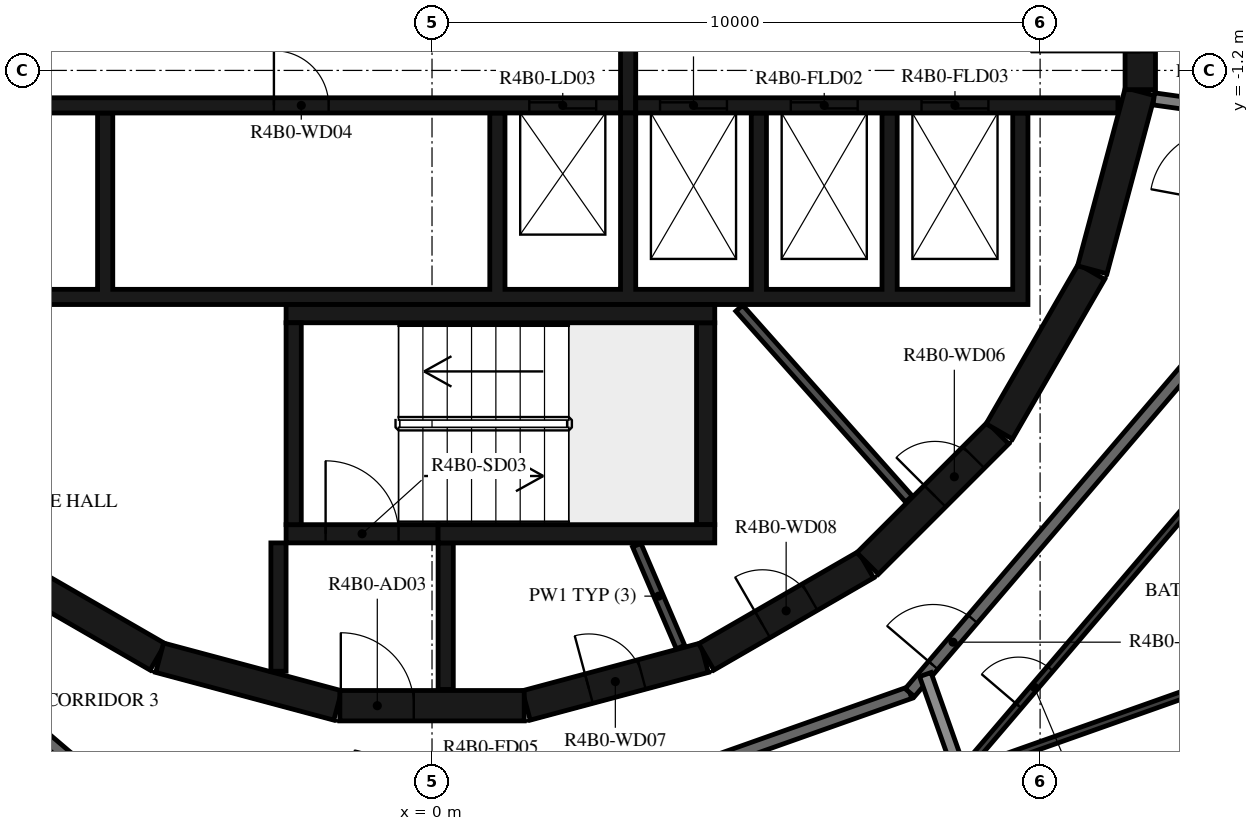
"""IFC4 building model, lengths in metres.
Left out: names, types, materials, properties, quantities, classifications, styles, units other than length and angle.
Written with IfcOpenShell. Run it as: python <this file> out.ifc"""

import sys

from ifc_helpers import new_model, si_unit, direction, frame, frame_2d, origin, place, context, subcontext, project, spatial, polyline, rectangle, outline, extrude, element, fill, save


model = new_model("IFC4")
c1 = context("Model", 3, precision=1e-05, world=origin(), true_north=direction((0.0, 1.0)))
c2 = subcontext(c1, "Body", "Model", "MODEL_VIEW")
j1 = project(units=[si_unit("LENGTHUNIT", "METRE"), si_unit("PLANEANGLEUNIT", "RADIAN")], contexts=[c1])
p1 = place(None, origin())
s1 = spatial("IfcSite", under=j1, at=p1, CompositionType="ELEMENT")
p2 = place(p1, origin())
s2 = spatial("IfcBuilding", under=s1, at=p2, CompositionType="ELEMENT")
p3 = place(p2, frame((0.0, 0.0, 165.7)))
s3 = spatial("IfcBuildingStorey", under=s2, at=p3, CompositionType="ELEMENT", Elevation=165.7)
p4 = place(p3, frame((1.55, -11.643, 0.0), z_axis=(0.0, 0.0, 1.0), x_axis=(0.965948410781, 0.258734743916, 0.0)))
e1 = element("IfcWall", 1, at=p4, inside=s3, PredefinedType="SHEAR", context=c2, shape_type="SweptSolid", body=[
    extrude(rectangle(XDim=3.033, YDim=0.5, at=frame_2d((1.516, 0.0))), origin(), (0.0, 0.0, 1.0), 3.12),
])
p5 = place(p4, frame((1.066, 0.0, 0.0)))
e2 = element("IfcOpeningElement", 2, at=p5, cuts=e1, PredefinedType="OPENING", context=c2, shape_type="SweptSolid", body=[
    extrude(rectangle(XDim=0.9, YDim=2.1, at=frame_2d((0.45, 1.05))), frame((0.0, 0.26, 0.0), z_axis=(0.0, -1.0, 0.0), x_axis=(1.0, 0.0, 0.0)), (0.0, 0.0, 1.0), 0.52),
])
p6 = place(p3, frame((4.51, -10.845, 0.0), z_axis=(0.0, 0.0, 1.0), x_axis=(0.865975092491, 0.500087131594, 0.0)))
e3 = element("IfcWall", 3, at=p6, inside=s3, PredefinedType="SHEAR", context=c2, shape_type="SweptSolid", body=[
    extrude(rectangle(XDim=3.033, YDim=0.5, at=frame_2d((1.516, 0.0))), origin(), (0.0, 0.0, 1.0), 3.12),
])
p7 = place(p6, frame((1.066, 0.0, 0.0)))
e4 = element("IfcOpeningElement", 4, at=p7, cuts=e3, PredefinedType="OPENING", context=c2, shape_type="SweptSolid", body=[
    extrude(rectangle(XDim=0.9, YDim=2.1, at=frame_2d((0.45, 1.05))), frame((0.0, 0.26, 0.0), z_axis=(0.0, -1.0, 0.0), x_axis=(1.0, 0.0, 0.0)), (0.0, 0.0, 1.0), 0.52),
])
p8 = place(p3, frame((7.164, -9.308, 0.0), z_axis=(0.0, 0.0, 1.0), x_axis=(0.707106781187, 0.707106781187, 0.0)))
e5 = element("IfcWall", 5, at=p8, inside=s3, PredefinedType="SHEAR", context=c2, shape_type="SweptSolid", body=[
    extrude(rectangle(XDim=3.032, YDim=0.5, at=frame_2d((1.516, 0.0))), origin(), (0.0, 0.0, 1.0), 3.12),
])
p9 = place(p8, frame((1.566, 0.0, 0.0)))
e6 = element("IfcOpeningElement", 6, at=p9, cuts=e5, PredefinedType="OPENING", context=c2, shape_type="SweptSolid", body=[
    extrude(rectangle(XDim=0.9, YDim=2.1, at=frame_2d((0.45, 1.05))), frame((0.0, 0.26, 0.0), z_axis=(0.0, -1.0, 0.0), x_axis=(1.0, 0.0, 0.0)), (0.0, 0.0, 1.0), 0.52),
])
for number, where, z_axis, x_axis in (
    (7, (9.329, -7.137, 0.0), (0.0, 0.0, 1.0), (0.5, 0.866, 0.0)),
    (8, (10.858, -4.479, 0.0), (0.0, 0.0, 1.0), (0.259, 0.966, 0.0)),
):
    element("IfcWall", number, at=place(p3, frame(where, z_axis=z_axis, x_axis=x_axis)), inside=s3, PredefinedType="SHEAR", context=c2, shape_type="SweptSolid", body=[
        extrude(rectangle(XDim=3.033, YDim=0.5, at=frame_2d((1.516, 0.0))), origin(), (0.0, 0.0, 1.0), 3.12),
    ])
p10 = place(p3, frame((11.647, -1.516, 0.0), z_axis=(0.0, 0.0, 1.0), x_axis=(0.0, 1.0, 0.0)))
e9 = element("IfcWall", 9, at=p10, inside=s3, PredefinedType="SHEAR", context=c2, shape_type="SweptSolid", body=[
    extrude(rectangle(XDim=3.033, YDim=0.5, at=frame_2d((1.516, 0.0))), origin(), (0.0, 0.0, 1.0), 3.12),
])
p11 = place(p10, frame((0.616, 0.0, 0.0)))
e10 = element("IfcOpeningElement", 10, at=p11, cuts=e9, PredefinedType="OPENING", context=c2, shape_type="SweptSolid", body=[
    extrude(rectangle(XDim=1.8, YDim=2.1, at=frame_2d((0.9, 1.05))), frame((0.0, 0.26, 0.0), z_axis=(0.0, -1.0, 0.0), x_axis=(1.0, 0.0, 0.0)), (0.0, 0.0, 1.0), 0.52),
])
for number, where, z_axis, x_axis in (
    (11, (-7.137, -9.329, 0.0), (0.0, 0.0, 1.0), (0.866, -0.5, 0.0)),
    (12, (-4.479, -10.858, 0.0), (0.0, 0.0, 1.0), (0.966, -0.259, 0.0)),
):
    element("IfcWall", number, at=place(p3, frame(where, z_axis=z_axis, x_axis=x_axis)), inside=s3, PredefinedType="SHEAR", context=c2, shape_type="SweptSolid", body=[
        extrude(rectangle(XDim=3.033, YDim=0.5, at=frame_2d((1.516, 0.0))), origin(), (0.0, 0.0, 1.0), 3.12),
    ])
p12 = place(p3, frame((-1.516, -11.647, 0.0), z_axis=(0.0, 0.0, 1.0), x_axis=(1.0, 0.0, 0.0)))
e13 = element("IfcWall", 13, at=p12, inside=s3, PredefinedType="SHEAR", context=c2, shape_type="SweptSolid", body=[
    extrude(rectangle(XDim=3.033, YDim=0.5, at=frame_2d((1.516, 0.0))), origin(), (0.0, 0.0, 1.0), 3.12),
])
p13 = place(p12, frame((0.016, 0.0, 0.0)))
e14 = element("IfcOpeningElement", 14, at=p13, cuts=e13, PredefinedType="OPENING", context=c2, shape_type="SweptSolid", body=[
    extrude(rectangle(XDim=1.2, YDim=2.1, at=frame_2d((0.6, 1.05))), frame((0.0, 0.26, 0.0), z_axis=(0.0, -1.0, 0.0), x_axis=(1.0, 0.0, 0.0)), (0.0, 0.0, 1.0), 0.52),
])
p14 = place(p3, frame((-2.275, -8.67, 0.0), z_axis=(0.0, 0.0, 1.0), x_axis=(0.0, 1.0, 0.0)))
e15 = element("IfcWall", 15, at=p14, inside=s3, PredefinedType="SHEAR", context=c2, shape_type="SweptSolid", body=[
    extrude(rectangle(XDim=3.32, YDim=0.25, at=frame_2d((1.66, 0.0))), origin(), (0.0, 0.0, 1.0), 3.12),
])
p15 = place(p3, frame((-2.4, -5.2, 0.0), z_axis=(0.0, 0.0, 1.0), x_axis=(1.0, 0.0, 0.0)))
e16 = element("IfcWall", 16, at=p15, inside=s3, PredefinedType="SHEAR", context=c2, shape_type="SweptSolid", body=[
    extrude(rectangle(XDim=7.05, YDim=0.3, at=frame_2d((3.525, 0.0))), origin(), (0.0, 0.0, 1.0), 3.12),
])
p16 = place(p3, frame((4.5, -8.67, 0.0), z_axis=(0.0, 0.0, 1.0), x_axis=(0.0, 1.0, 0.0)))
e17 = element("IfcWall", 17, at=p16, inside=s3, PredefinedType="SHEAR", context=c2, shape_type="SweptSolid", body=[
    extrude(rectangle(XDim=3.32, YDim=0.3, at=frame_2d((1.66, 0.0))), origin(), (0.0, 0.0, 1.0), 3.12),
])
p17 = place(p3, frame((0.1, -8.82, 0.0), z_axis=(0.0, 0.0, 1.0), x_axis=(1.0, 0.0, 0.0)))
e18 = element("IfcWall", 18, at=p17, inside=s3, PredefinedType="SHEAR", context=c2, shape_type="SweptSolid", body=[
    extrude(rectangle(XDim=4.55, YDim=0.3, at=frame_2d((2.275, 0.0))), origin(), (0.0, 0.0, 1.0), 3.12),
])
p18 = place(p3, frame((-2.4, -8.82, 0.0), z_axis=(0.0, 0.0, 1.0), x_axis=(1.0, 0.0, 0.0)))
e19 = element("IfcWall", 19, at=p18, inside=s3, PredefinedType="SHEAR", context=c2, shape_type="SweptSolid", body=[
    extrude(rectangle(XDim=2.5, YDim=0.3, at=frame_2d((1.25, 0.0))), origin(), (0.0, 0.0, 1.0), 3.12),
])
p19 = place(p18, frame((0.65, 0.0, 0.0)))
e20 = element("IfcOpeningElement", 20, at=p19, cuts=e19, PredefinedType="OPENING", context=c2, shape_type="SweptSolid", body=[
    extrude(rectangle(XDim=1.2, YDim=2.1, at=frame_2d((0.6, 1.05))), frame((0.0, 0.16, 0.0), z_axis=(0.0, -1.0, 0.0), x_axis=(1.0, 0.0, 0.0)), (0.0, 0.0, 1.0), 0.32),
])
p20 = place(p3, frame((-2.525, -8.97, 0.0), z_axis=(0.0, 0.0, 1.0), x_axis=(0.0, -1.0, 0.0)))
e21 = element("IfcWall", 21, at=p20, inside=s3, PredefinedType="SHEAR", context=c2, shape_type="SweptSolid", body=[
    extrude(rectangle(XDim=2.11, YDim=0.25, at=frame_2d((1.055, 0.0))), origin(), (0.0, 0.0, 1.0), 3.12),
])
p21 = place(p3, frame((0.225, -8.97, 0.0), z_axis=(0.0, 0.0, 1.0), x_axis=(0.0, -1.0, 0.0)))
e22 = element("IfcWall", 22, at=p21, inside=s3, PredefinedType="SHEAR", context=c2, shape_type="SweptSolid", body=[
    extrude(rectangle(XDim=2.41, YDim=0.25, at=frame_2d((1.205, 0.0))), origin(), (0.0, 0.0, 1.0), 3.12),
])
p22 = place(p3, origin())
e23 = element("IfcWall", 23, at=p22, inside=s3, PredefinedType="SHEAR", context=c2, shape_type="SweptSolid", body=[
    extrude(outline(polyline([(9.8, -5.05), (9.8, -4.8), (9.8, -1.9), (9.55, -1.9), (9.55, -4.8), (7.65, -4.8), (7.65, -1.9), (7.4, -1.9), (7.4, -4.8), (5.5, -4.8), (5.5, -1.9), (5.25, -1.9), (5.25, -4.8), (3.35, -4.8), (3.35, -1.9), (3.1, -1.9), (3.1, -4.8), (1.2, -4.8), (1.2, -1.9), (0.95, -1.9), (0.95, -4.8), (-5.25, -4.8), (-5.25, -1.9), (-5.5, -1.9), (-5.5, -4.8), (-7.4, -4.8), (-7.4, -1.9), (-7.65, -1.9), (-7.65, -4.8), (-9.55, -4.8), (-9.55, -1.9), (-9.8, -1.9), (-9.8, -4.8), (-9.8, -5.05), (9.8, -5.05)])), origin(), (0.0, 0.0, 1.0), 3.12),
])
p23 = place(p3, frame((-11.28, -1.775, 0.0), z_axis=(0.0, 0.0, 1.0), x_axis=(1.0, 0.0, 0.0)))
e24 = element("IfcWall", 24, at=p23, inside=s3, PredefinedType="SHEAR", context=c2, shape_type="SweptSolid", body=[
    extrude(rectangle(XDim=14.38, YDim=0.25, at=frame_2d((7.19, 0.0))), origin(), (0.0, 0.0, 1.0), 3.12),
])
p24 = place(p23, frame((12.88, 0.0, 0.0)))
e25 = element("IfcOpeningElement", 25, at=p24, cuts=e24, PredefinedType="OPENING", context=c2, shape_type="SweptSolid", body=[
    extrude(rectangle(XDim=1.1, YDim=2.1, at=frame_2d((0.55, 1.05))), frame((0.0, 0.135, 0.0), z_axis=(0.0, -1.0, 0.0), x_axis=(1.0, 0.0, 0.0)), (0.0, 0.0, 1.0), 0.27),
])
p25 = place(p23, frame((8.68, 0.0, 0.0)))
e26 = element("IfcOpeningElement", 26, at=p25, cuts=e24, PredefinedType="OPENING", context=c2, shape_type="SweptSolid", body=[
    extrude(rectangle(XDim=0.9, YDim=2.1, at=frame_2d((0.45, 1.05))), frame((0.0, 0.135, 0.0), z_axis=(0.0, -1.0, 0.0), x_axis=(1.0, 0.0, 0.0)), (0.0, 0.0, 1.0), 0.27),
])
p26 = place(p3, frame((3.35, -1.775, 0.0), z_axis=(0.0, 0.0, 1.0), x_axis=(1.0, 0.0, 0.0)))
e27 = element("IfcWall", 27, at=p26, inside=s3, PredefinedType="SHEAR", context=c2, shape_type="SweptSolid", body=[
    extrude(rectangle(XDim=7.93, YDim=0.25, at=frame_2d((3.965, 0.0))), origin(), (0.0, 0.0, 1.0), 3.12),
])
p27 = place(p26, frame((0.4, 0.0, 0.0)))
e28 = element("IfcOpeningElement", 28, at=p27, cuts=e27, PredefinedType="OPENING", context=c2, shape_type="SweptSolid", body=[
    extrude(rectangle(XDim=1.1, YDim=2.4, at=frame_2d((0.55, 1.2))), frame((0.0, 0.135, 0.0), z_axis=(0.0, -1.0, 0.0), x_axis=(1.0, 0.0, 0.0)), (0.0, 0.0, 1.0), 0.27),
])
p28 = place(p26, frame((2.55, 0.0, 0.0)))
e29 = element("IfcOpeningElement", 29, at=p28, cuts=e27, PredefinedType="OPENING", context=c2, shape_type="SweptSolid", body=[
    extrude(rectangle(XDim=1.1, YDim=2.4, at=frame_2d((0.55, 1.2))), frame((0.0, 0.135, 0.0), z_axis=(0.0, -1.0, 0.0), x_axis=(1.0, 0.0, 0.0)), (0.0, 0.0, 1.0), 0.27),
])
p29 = place(p26, frame((4.7, 0.0, 0.0)))
e30 = element("IfcOpeningElement", 30, at=p29, cuts=e27, PredefinedType="OPENING", context=c2, shape_type="SweptSolid", body=[
    extrude(rectangle(XDim=1.1, YDim=2.4, at=frame_2d((0.55, 1.2))), frame((0.0, 0.135, 0.0), z_axis=(0.0, -1.0, 0.0), x_axis=(1.0, 0.0, 0.0)), (0.0, 0.0, 1.0), 0.27),
])
p30 = place(p3, frame((3.225, -1.9, 0.0), z_axis=(0.0, 0.0, 1.0), x_axis=(0.0, 1.0, 0.0)))
e31 = element("IfcWall", 31, at=p30, inside=s3, PredefinedType="SHEAR", context=c2, shape_type="SweptSolid", body=[
    extrude(rectangle(XDim=3.8, YDim=0.25, at=frame_2d((1.9, 0.0))), origin(), (0.0, 0.0, 1.0), 3.12),
])
p31 = place(p3, frame((7.842, -8.248, 0.0), z_axis=(0.0, 0.0, 1.0), x_axis=(-0.66446128181, 0.747322691329, 0.0)))
e32 = element("IfcWall", 32, at=p31, inside=s3, PredefinedType="PARTITIONING", context=c2, shape_type="SweptSolid", body=[
    extrude(rectangle(XDim=4.198, YDim=0.15, at=frame_2d((2.099, 0.0))), origin(), (0.0, 0.0, 1.0), 3.12),
])
p32 = place(p3, frame((3.367, -9.007, 0.0), z_axis=(0.0, 0.0, 1.0), x_axis=(0.394387482265, -0.918944238696, 0.0)))
e33 = element("IfcWall", 33, at=p32, inside=s3, PredefinedType="PARTITIONING", context=c2, shape_type="SweptSolid", body=[
    extrude(rectangle(XDim=1.825, YDim=0.15, at=frame_2d((0.913, 0.0))), origin(), (0.0, 0.0, 1.0), 3.12),
])
p33 = place(p3, frame((13.282, -1.867, 0.0), z_axis=(0.0, 0.0, 1.0), x_axis=(-0.990265430288, 0.139191873241, 0.0)))
e34 = element("IfcWall", 34, at=p33, inside=s3, PredefinedType="STANDARD", context=c2, shape_type="SweptSolid", body=[
    extrude(rectangle(XDim=1.426, YDim=0.2, at=frame_2d((0.713, 0.0))), origin(), (0.0, 0.0, 1.0), 3.12),
])
p34 = place(p3, frame((-11.433, -7.858, 0.0), z_axis=(0.0, 0.0, 1.0), x_axis=(0.760412154545, -0.649440801937, 0.0)))
e35 = element("IfcWall", 35, at=p34, inside=s3, PredefinedType="STANDARD", context=c2, shape_type="SweptSolid", body=[
    extrude(rectangle(XDim=7.181, YDim=0.2, at=frame_2d((3.59, 0.0))), origin(), (0.0, 0.0, 1.0), 3.12),
])
p35 = place(p34, frame((2.39, 0.0, 0.0)))
e36 = element("IfcOpeningElement", 36, at=p35, cuts=e35, PredefinedType="OPENING", context=c2, shape_type="SweptSolid", body=[
    extrude(rectangle(XDim=1.0, YDim=2.1, at=frame_2d((0.5, 1.05))), frame((0.0, 0.11, 0.0), z_axis=(0.0, -1.0, 0.0), x_axis=(1.0, 0.0, 0.0)), (0.0, 0.0, 1.0), 0.22),
])
p36 = place(p3, frame((1.088, -13.83, 0.0), z_axis=(0.0, 0.0, 1.0), x_axis=(0.942648397945, 0.333787354241, 0.0)))
e37 = element("IfcWall", 37, at=p36, inside=s3, PredefinedType="STANDARD", context=c2, shape_type="SweptSolid", body=[
    extrude(rectangle(XDim=7.181, YDim=0.2, at=frame_2d((3.591, 0.0))), origin(), (0.0, 0.0, 1.0), 3.12),
])
p37 = place(p3, frame((7.858, -11.433, 0.0), z_axis=(0.0, 0.0, 1.0), x_axis=(0.649440801937, 0.760412154545, 0.0)))
e38 = element("IfcWall", 38, at=p37, inside=s3, PredefinedType="STANDARD", context=c2, shape_type="SweptSolid", body=[
    extrude(rectangle(XDim=7.181, YDim=0.2, at=frame_2d((3.59, 0.0))), origin(), (0.0, 0.0, 1.0), 3.12),
])
p38 = place(p37, frame((0.592, 0.0, 0.0)))
e39 = element("IfcOpeningElement", 39, at=p38, cuts=e38, PredefinedType="OPENING", context=c2, shape_type="SweptSolid", body=[
    extrude(rectangle(XDim=1.0, YDim=2.1, at=frame_2d((0.5, 1.05))), frame((0.0, 0.11, 0.0), z_axis=(0.0, -1.0, 0.0), x_axis=(1.0, 0.0, 0.0)), (0.0, 0.0, 1.0), 0.22),
])
p39 = place(p3, frame((9.891, -16.158, 0.0), z_axis=(0.0, 0.0, 1.0), x_axis=(-0.333807281402, 0.942641341594, 0.0)))
e40 = element("IfcWall", 40, at=p39, inside=s3, PredefinedType="STANDARD", context=c2, shape_type="SweptSolid", body=[
    extrude(rectangle(XDim=5.329, YDim=0.2, at=frame_2d((2.665, 0.0))), origin(), (0.0, 0.0, 1.0), 2.73),
])
p40 = place(p3, frame((8.737, -12.713, 0.0), z_axis=(0.0, 0.0, 1.0), x_axis=(0.649430604754, 0.760420863476, 0.0)))
e41 = element("IfcWall", 41, at=p40, inside=s3, PredefinedType="PARTITIONING", context=c2, shape_type="SweptSolid", body=[
    extrude(rectangle(XDim=7.985, YDim=0.12, at=frame_2d((3.992, 0.0))), origin(), (0.0, 0.0, 1.0), 3.12),
])
p41 = place(p40, frame((1.4, 0.0, 0.0)))
e42 = element("IfcOpeningElement", 42, at=p41, cuts=e41, PredefinedType="OPENING", context=c2, shape_type="SweptSolid", body=[
    extrude(rectangle(XDim=0.8, YDim=2.1, at=frame_2d((0.4, 1.05))), frame((0.0, 0.07, 0.0), z_axis=(0.0, -1.0, 0.0), x_axis=(1.0, 0.0, 0.0)), (0.0, 0.0, 1.0), 0.14),
])
p42 = place(p3, frame((14.183, -10.819, 0.0), z_axis=(0.0, 0.0, 1.0), x_axis=(-0.942646448855, -0.333792858612, 0.0)))
e43 = element("IfcWall", 43, at=p42, inside=s3, PredefinedType="PARTITIONING", context=c2, shape_type="SweptSolid", body=[
    extrude(rectangle(XDim=5.828, YDim=0.12, at=frame_2d((2.914, 0.0))), origin(), (0.0, 0.0, 1.0), 3.12),
])
p43 = place(p19, origin())
e44 = element("IfcDoor", 44, at=p43, inside=s3, OperationType="SINGLE_SWING_LEFT", PredefinedType="DOOR", context=c2, shape_type="SweptSolid", body=[
    extrude(rectangle(XDim=1.2, YDim=2.1, at=frame_2d((0.6, 1.05))), frame((0.0, 0.025, 0.0), z_axis=(0.0, -1.0, 0.0), x_axis=(1.0, 0.0, 0.0)), (0.0, 0.0, 1.0), 0.05),
])
fill(e20, e44)
p44 = place(p13, origin())
e45 = element("IfcDoor", 45, at=p44, inside=s3, OperationType="SINGLE_SWING_RIGHT", PredefinedType="DOOR", context=c2, shape_type="SweptSolid", body=[
    extrude(rectangle(XDim=1.2, YDim=2.1, at=frame_2d((0.6, 1.05))), frame((0.0, 0.025, 0.0), z_axis=(0.0, -1.0, 0.0), x_axis=(1.0, 0.0, 0.0)), (0.0, 0.0, 1.0), 0.05),
])
fill(e14, e45)
p45 = place(p11, origin())
e46 = element("IfcDoor", 46, at=p45, inside=s3, OperationType="DOUBLE_DOOR_SINGLE_SWING", PredefinedType="DOOR", context=c2, shape_type="SweptSolid", body=[
    extrude(rectangle(XDim=1.8, YDim=2.1, at=frame_2d((0.9, 1.05))), frame((0.0, 0.025, 0.0), z_axis=(0.0, -1.0, 0.0), x_axis=(1.0, 0.0, 0.0)), (0.0, 0.0, 1.0), 0.05),
])
fill(e10, e46)
p46 = place(p24, origin())
e47 = element("IfcDoor", 47, at=p46, inside=s3, OperationType="DOUBLE_DOOR_SLIDING", PredefinedType="DOOR", context=c2, shape_type="SweptSolid", body=[
    extrude(rectangle(XDim=1.1, YDim=2.1, at=frame_2d((0.55, 1.05))), frame((0.0, 0.025, 0.0), z_axis=(0.0, -1.0, 0.0), x_axis=(1.0, 0.0, 0.0)), (0.0, 0.0, 1.0), 0.05),
])
fill(e25, e47)
p47 = place(p27, origin())
e48 = element("IfcDoor", 48, at=p47, inside=s3, OperationType="DOUBLE_DOOR_SLIDING", PredefinedType="DOOR", context=c2, shape_type="SweptSolid", body=[
    extrude(rectangle(XDim=1.1, YDim=2.4, at=frame_2d((0.55, 1.2))), frame((0.0, 0.025, 0.0), z_axis=(0.0, -1.0, 0.0), x_axis=(1.0, 0.0, 0.0)), (0.0, 0.0, 1.0), 0.05),
])
fill(e28, e48)
p48 = place(p28, origin())
e49 = element("IfcDoor", 49, at=p48, inside=s3, OperationType="DOUBLE_DOOR_SLIDING", PredefinedType="DOOR", context=c2, shape_type="SweptSolid", body=[
    extrude(rectangle(XDim=1.1, YDim=2.4, at=frame_2d((0.55, 1.2))), frame((0.0, 0.025, 0.0), z_axis=(0.0, -1.0, 0.0), x_axis=(1.0, 0.0, 0.0)), (0.0, 0.0, 1.0), 0.05),
])
fill(e29, e49)
p49 = place(p29, origin())
e50 = element("IfcDoor", 50, at=p49, inside=s3, OperationType="DOUBLE_DOOR_SLIDING", PredefinedType="DOOR", context=c2, shape_type="SweptSolid", body=[
    extrude(rectangle(XDim=1.1, YDim=2.4, at=frame_2d((0.55, 1.2))), frame((0.0, 0.025, 0.0), z_axis=(0.0, -1.0, 0.0), x_axis=(1.0, 0.0, 0.0)), (0.0, 0.0, 1.0), 0.05),
])
fill(e30, e50)
p50 = place(p25, origin())
e51 = element("IfcDoor", 51, at=p50, inside=s3, OperationType="SINGLE_SWING_RIGHT", PredefinedType="DOOR", context=c2, shape_type="SweptSolid", body=[
    extrude(rectangle(XDim=0.9, YDim=2.1, at=frame_2d((0.45, 1.05))), frame((0.0, 0.025, 0.0), z_axis=(0.0, -1.0, 0.0), x_axis=(1.0, 0.0, 0.0)), (0.0, 0.0, 1.0), 0.05),
])
fill(e26, e51)
p51 = place(p9, origin())
e52 = element("IfcDoor", 52, at=p51, inside=s3, OperationType="SINGLE_SWING_RIGHT", PredefinedType="DOOR", context=c2, shape_type="SweptSolid", body=[
    extrude(rectangle(XDim=0.9, YDim=2.1, at=frame_2d((0.45, 1.05))), frame((0.0, 0.025, 0.0), z_axis=(0.0, -1.0, 0.0), x_axis=(1.0, 0.0, 0.0)), (0.0, 0.0, 1.0), 0.05),
])
fill(e6, e52)
p52 = place(p5, origin())
e53 = element("IfcDoor", 53, at=p52, inside=s3, OperationType="SINGLE_SWING_LEFT", PredefinedType="DOOR", context=c2, shape_type="SweptSolid", body=[
    extrude(rectangle(XDim=0.9, YDim=2.1, at=frame_2d((0.45, 1.05))), frame((0.0, 0.025, 0.0), z_axis=(0.0, -1.0, 0.0), x_axis=(1.0, 0.0, 0.0)), (0.0, 0.0, 1.0), 0.05),
])
fill(e2, e53)
p53 = place(p7, origin())
e54 = element("IfcDoor", 54, at=p53, inside=s3, OperationType="SINGLE_SWING_RIGHT", PredefinedType="DOOR", context=c2, shape_type="SweptSolid", body=[
    extrude(rectangle(XDim=0.9, YDim=2.1, at=frame_2d((0.45, 1.05))), frame((0.0, 0.025, 0.0), z_axis=(0.0, -1.0, 0.0), x_axis=(1.0, 0.0, 0.0)), (0.0, 0.0, 1.0), 0.05),
])
fill(e4, e54)
p54 = place(p38, origin())
e55 = element("IfcDoor", 55, at=p54, inside=s3, OperationType="SINGLE_SWING_RIGHT", PredefinedType="DOOR", context=c2, shape_type="SweptSolid", body=[
    extrude(rectangle(XDim=1.0, YDim=2.1, at=frame_2d((0.5, 1.05))), frame((0.0, 0.025, 0.0), z_axis=(0.0, -1.0, 0.0), x_axis=(1.0, 0.0, 0.0)), (0.0, 0.0, 1.0), 0.05),
])
fill(e39, e55)
p55 = place(p41, origin())
e56 = element("IfcDoor", 56, at=p55, inside=s3, OperationType="SINGLE_SWING_RIGHT", PredefinedType="DOOR", context=c2, shape_type="SweptSolid", body=[
    extrude(rectangle(XDim=0.8, YDim=2.1, at=frame_2d((0.4, 1.05))), frame((0.0, 0.025, 0.0), z_axis=(0.0, -1.0, 0.0), x_axis=(1.0, 0.0, 0.0)), (0.0, 0.0, 1.0), 0.05),
])
fill(e42, e56)
save(model, sys.argv[1])
